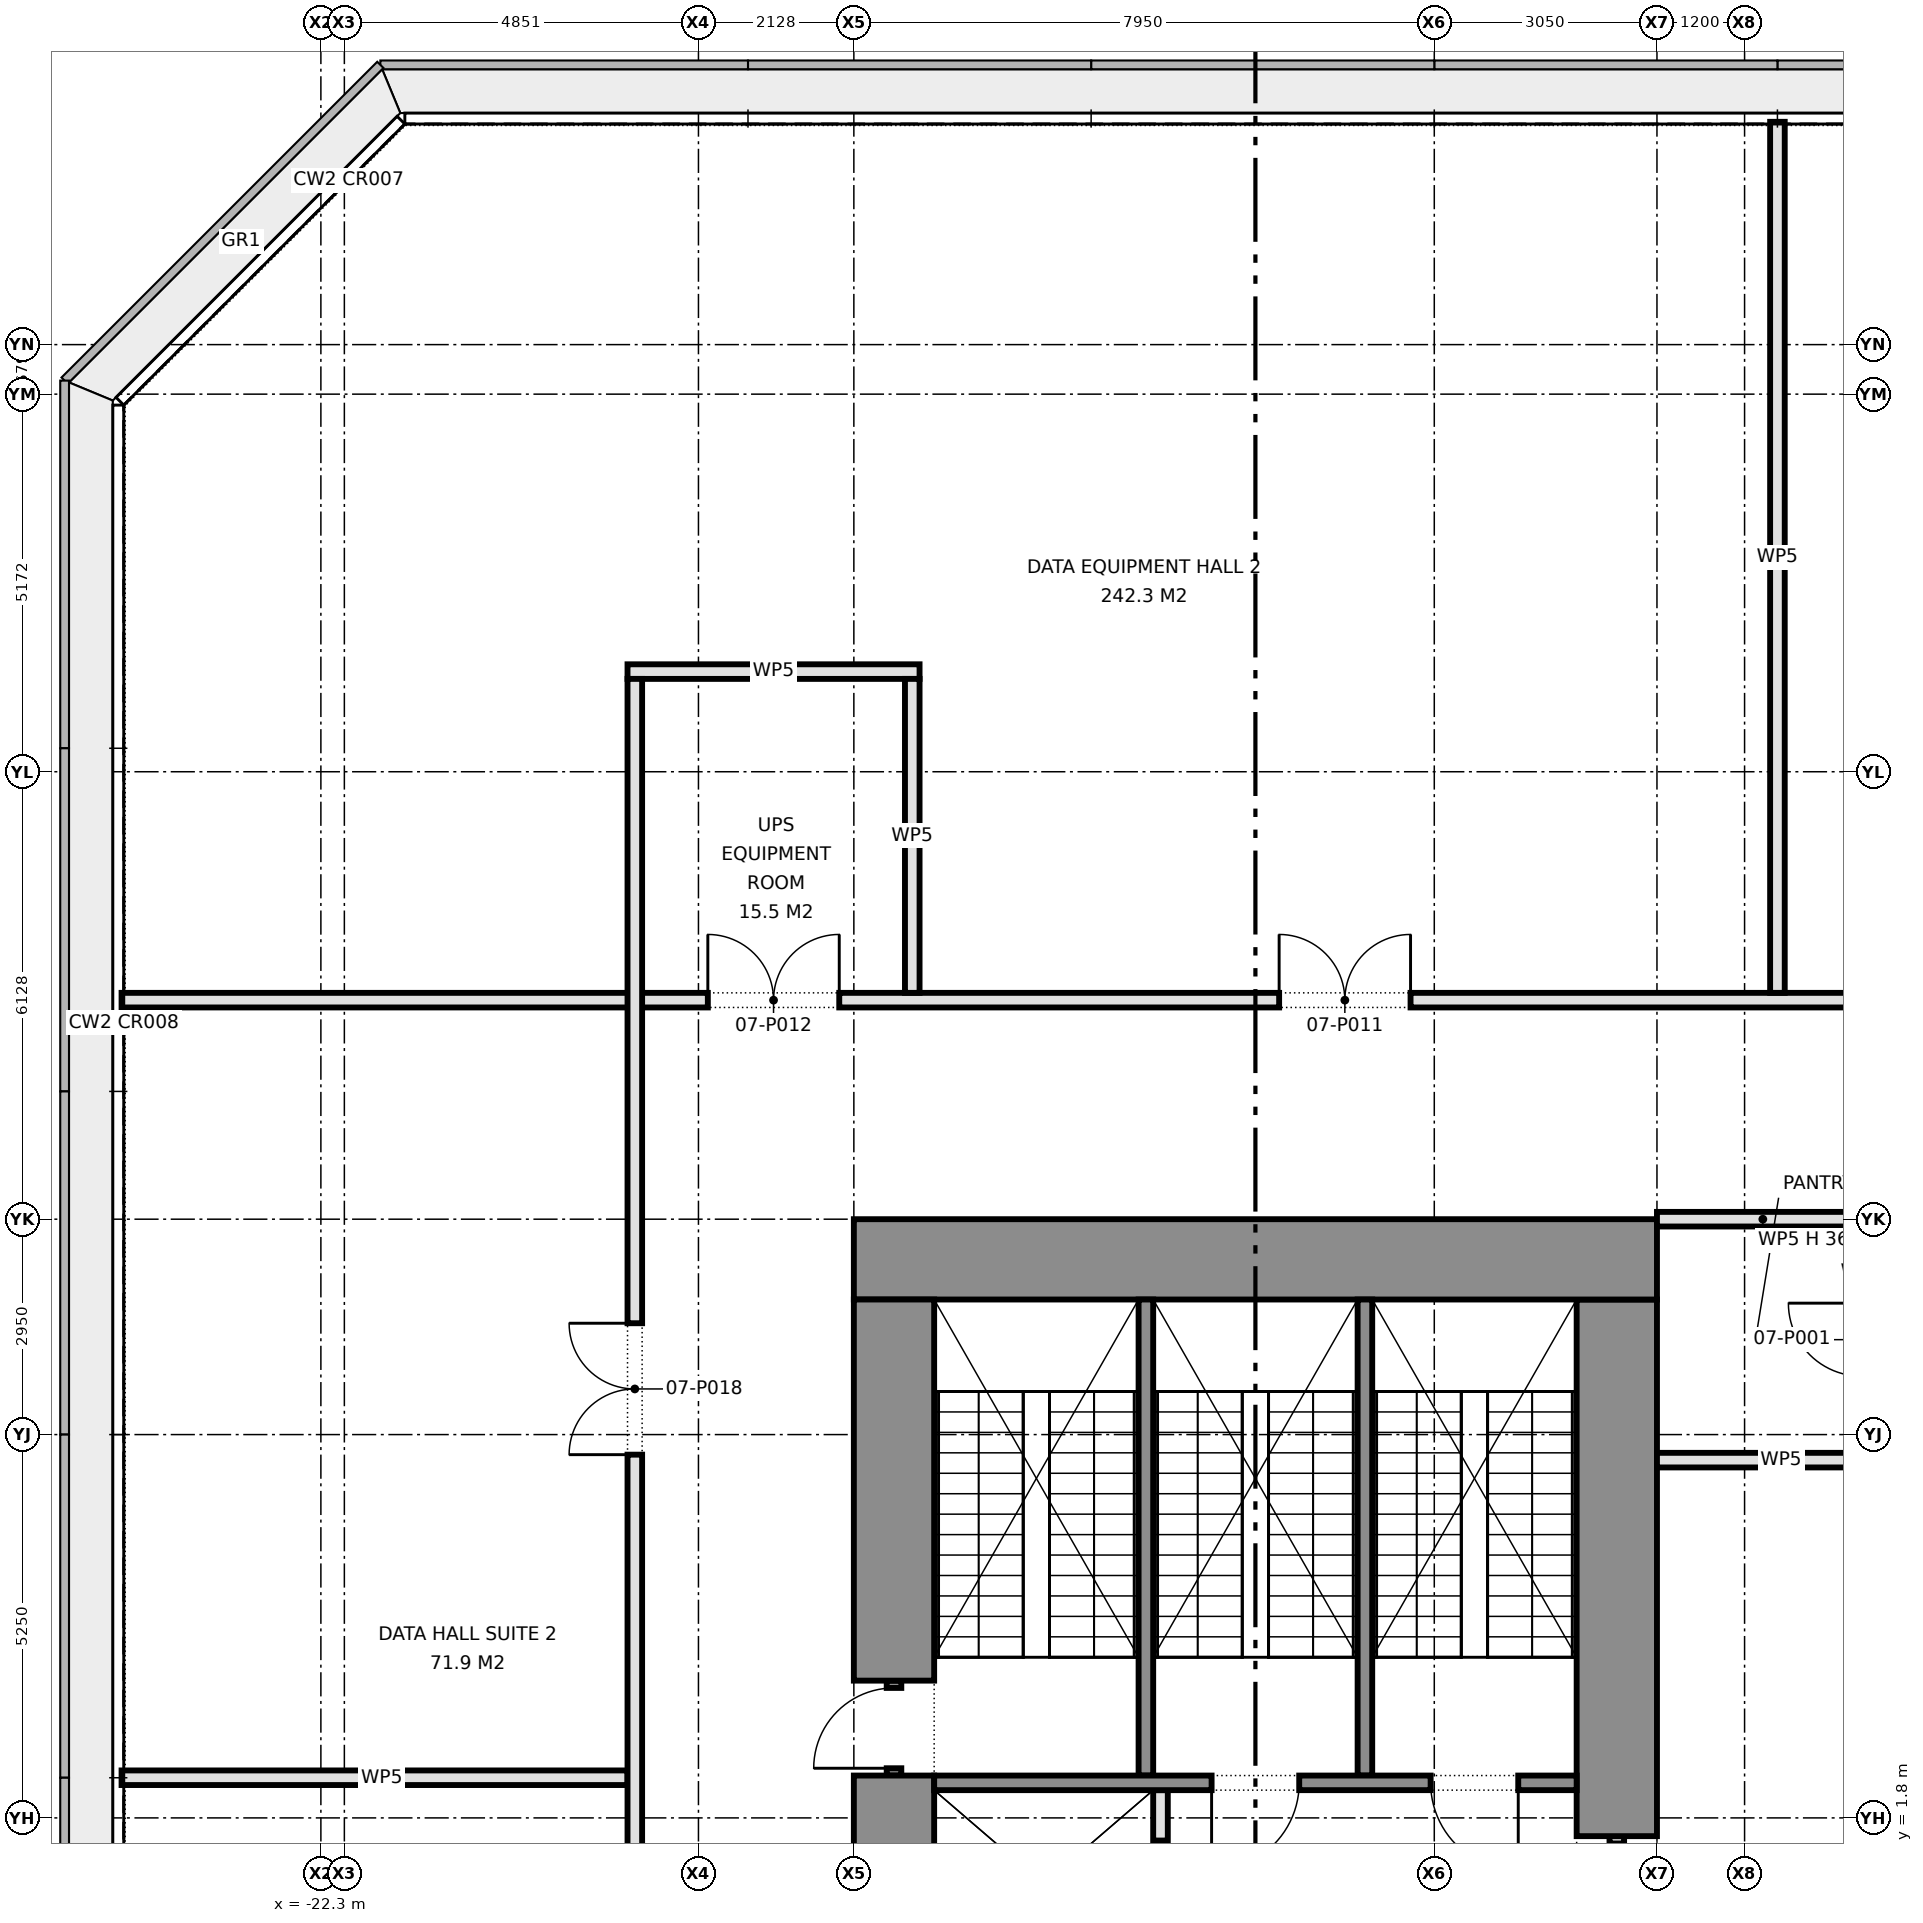
"""IFC4 building model, lengths in metres.
Left out: names, types, materials, properties, quantities, classifications, styles, units other than length and angle.
Written with IfcOpenShell. Run it as: python <this file> out.ifc"""

import sys

from ifc_helpers import new_model, si_unit, direction, frame, frame_2d, origin, place, context, subcontext, project, spatial, rectangle, extrude, element, fill, save


model = new_model("IFC4")
c1 = context("Model", 3, precision=1e-05, world=origin(), true_north=direction((0.0, 1.0)))
c2 = subcontext(c1, "Body", "Model", "MODEL_VIEW")
j1 = project(units=[si_unit("LENGTHUNIT", "METRE"), si_unit("PLANEANGLEUNIT", "RADIAN")], contexts=[c1])
p1 = place(None, origin())
s1 = spatial("IfcSite", under=j1, at=p1, CompositionType="ELEMENT")
p2 = place(p1, origin())
s2 = spatial("IfcBuilding", under=s1, at=p2, CompositionType="ELEMENT")
p3 = place(p2, frame((0.0, 0.0, 30.5)))
s3 = spatial("IfcBuildingStorey", under=s2, at=p3, CompositionType="ELEMENT", Elevation=30.5)
p4 = place(p3, frame((-15.0, 9.45, 0.0), z_axis=(0.0, 0.0, 1.0), x_axis=(1.0, 0.0, 0.0)))
e1 = element("IfcWall", 1, at=p4, inside=s3, PredefinedType="SHEAR", context=c2, shape_type="SweptSolid", body=[
    extrude(rectangle(XDim=11.0, YDim=1.1, at=frame_2d((5.5, 0.0))), origin(), (0.0, 0.0, 1.0), 4.575),
])
p5 = place(p3, frame((-14.45, -3.75, 0.0), z_axis=(0.0, 0.0, 1.0), x_axis=(0.0, 1.0, 0.0)))
e2 = element("IfcWall", 2, at=p5, inside=s3, PredefinedType="SHEAR", context=c2, shape_type="SweptSolid", body=[
    extrude(rectangle(XDim=6.13, YDim=1.1, at=frame_2d((3.065, 0.0))), origin(), (0.0, 0.0, 1.0), 4.575),
])
p6 = place(p3, frame((-14.45, 2.38, 0.0), z_axis=(0.0, 0.0, 1.0), x_axis=(0.0, 1.0, 0.0)))
e3 = element("IfcWall", 3, at=p6, inside=s3, PredefinedType="SHEAR", context=c2, shape_type="SweptSolid", body=[
    extrude(rectangle(XDim=1.3, YDim=0.2, at=frame_2d((0.65, 0.0))), origin(), (0.0, 0.0, 1.0), 2.4),
])
p7 = place(p6, frame((0.1, 0.0, 0.0)))
e4 = element("IfcOpeningElement", 4, at=p7, cuts=e3, PredefinedType="OPENING", context=c2, shape_type="SweptSolid", body=[
    extrude(rectangle(XDim=1.1, YDim=2.1, at=frame_2d((0.55, 1.05))), frame((0.0, 0.11, 0.0), z_axis=(0.0, -1.0, 0.0), x_axis=(1.0, 0.0, 0.0)), (0.0, 0.0, 1.0), 0.22),
])
p8 = place(p3, frame((-14.45, 3.68, 0.0), z_axis=(0.0, 0.0, 1.0), x_axis=(0.0, 1.0, 0.0)))
e5 = element("IfcWall", 5, at=p8, inside=s3, PredefinedType="SHEAR", context=c2, shape_type="SweptSolid", body=[
    extrude(rectangle(XDim=5.22, YDim=1.1, at=frame_2d((2.61, 0.0))), origin(), (0.0, 0.0, 1.0), 4.575),
])
p9 = place(p3, frame((-4.55, 0.25, 0.0), z_axis=(0.0, 0.0, 1.0), x_axis=(0.0, 1.0, 0.0)))
e6 = element("IfcWall", 6, at=p9, inside=s3, PredefinedType="PARTITIONING", context=c2, shape_type="SweptSolid", body=[
    extrude(rectangle(XDim=1.3, YDim=0.2, at=frame_2d((0.65, 0.0))), origin(), (0.0, 0.0, 1.0), 2.4),
])
p10 = place(p9, frame((0.1, 0.0, 0.0)))
e7 = element("IfcOpeningElement", 7, at=p10, cuts=e6, PredefinedType="OPENING", context=c2, shape_type="SweptSolid", body=[
    extrude(rectangle(XDim=1.1, YDim=2.1, at=frame_2d((0.55, 1.05))), frame((0.0, 0.11, 0.0), z_axis=(0.0, -1.0, 0.0), x_axis=(1.0, 0.0, 0.0)), (0.0, 0.0, 1.0), 0.22),
])
p11 = place(p3, frame((-4.55, 1.55, 0.0), z_axis=(0.0, 0.0, 1.0), x_axis=(0.0, 1.0, 0.0)))
e8 = element("IfcWall", 8, at=p11, inside=s3, PredefinedType="SHEAR", context=c2, shape_type="SweptSolid", body=[
    extrude(rectangle(XDim=7.35, YDim=1.1, at=frame_2d((3.675, 0.0))), origin(), (0.0, 0.0, 1.0), 4.575),
])
p12 = place(p3, frame((-10.8, -0.4, 0.0), z_axis=(0.0, 0.0, 1.0), x_axis=(0.0, 1.0, 0.0)))
e9 = element("IfcWall", 9, at=p12, inside=s3, PredefinedType="PARTITIONING", context=c2, shape_type="SweptSolid", body=[
    extrude(rectangle(XDim=2.58, YDim=0.2, at=frame_2d((1.29, 0.0))), origin(), (0.0, 0.0, 1.0), 4.575),
])
p13 = place(p12, frame((0.69, 0.0, 0.0)))
e10 = element("IfcOpeningElement", 10, at=p13, cuts=e9, PredefinedType="OPENING", context=c2, shape_type="SweptSolid", body=[
    extrude(rectangle(XDim=1.2, YDim=2.1, at=frame_2d((0.6, 1.05))), frame((0.0, 0.11, 0.0), z_axis=(0.0, -1.0, 0.0), x_axis=(1.0, 0.0, 0.0)), (0.0, 0.0, 1.0), 0.22),
])
p14 = place(p3, frame((-13.9, 2.28, 0.0), z_axis=(0.0, 0.0, 1.0), x_axis=(1.0, 0.0, 0.0)))
e11 = element("IfcWall", 11, at=p14, inside=s3, PredefinedType="SHEAR", context=c2, shape_type="SweptSolid", body=[
    extrude(rectangle(XDim=8.8, YDim=0.2, at=frame_2d((4.4, 0.0))), origin(), (0.0, 0.0, 1.0), 4.575),
])
p15 = place(p14, frame((3.8, 0.0, 0.0)))
e12 = element("IfcOpeningElement", 12, at=p15, cuts=e11, PredefinedType="OPENING", context=c2, shape_type="SweptSolid", body=[
    extrude(rectangle(XDim=1.2, YDim=2.1, at=frame_2d((0.6, 1.05))), frame((0.0, 0.11, 0.0), z_axis=(0.0, -1.0, 0.0), x_axis=(1.0, 0.0, 0.0)), (0.0, 0.0, 1.0), 0.22),
])
p16 = place(p14, frame((6.8, 0.0, 0.0)))
e13 = element("IfcOpeningElement", 13, at=p16, cuts=e11, PredefinedType="OPENING", context=c2, shape_type="SweptSolid", body=[
    extrude(rectangle(XDim=1.2, YDim=2.1, at=frame_2d((0.6, 1.05))), frame((0.0, 0.11, 0.0), z_axis=(0.0, -1.0, 0.0), x_axis=(1.0, 0.0, 0.0)), (0.0, 0.0, 1.0), 0.22),
])
for number, where, z_axis, x_axis in (
    (14, (-11.0, 2.38, 0.0), (0.0, 0.0, 1.0), (0.0, 1.0, 0.0)),
    (15, (-8.0, 2.38, 0.0), (0.0, 0.0, 1.0), (0.0, 1.0, 0.0)),
):
    element("IfcWall", number, at=place(p3, frame(where, z_axis=z_axis, x_axis=x_axis)), inside=s3, PredefinedType="SHEAR", context=c2, shape_type="SweptSolid", body=[
        extrude(rectangle(XDim=6.52, YDim=0.2, at=frame_2d((3.26, 0.0))), origin(), (0.0, 0.0, 1.0), 4.575),
    ])
p17 = place(p3, frame((-25.03, 2.35, 0.0), z_axis=(0.0, 0.0, 1.0), x_axis=(1.0, 0.0, 0.0)))
e16 = element("IfcWall", 16, at=p17, inside=s3, PredefinedType="PARTITIONING", context=c2, shape_type="SweptSolid", body=[
    extrude(rectangle(XDim=6.93, YDim=0.2, at=frame_2d((3.465, 0.0))), origin(), (0.0, 0.0, 1.0), 4.575),
])
p18 = place(p3, frame((-4.0, 6.7, 0.0), z_axis=(0.0, 0.0, 1.0), x_axis=(1.0, 0.0, 0.0)))
e17 = element("IfcWall", 17, at=p18, inside=s3, PredefinedType="PARTITIONING", context=c2, shape_type="SweptSolid", body=[
    extrude(rectangle(XDim=2.9, YDim=0.2, at=frame_2d((1.45, 0.0))), origin(), (0.0, 0.0, 1.0), 4.575),
])
p19 = place(p3, frame((-4.0, 10.0, 0.0), z_axis=(0.0, 0.0, 1.0), x_axis=(1.0, 0.0, 0.0)))
e18 = element("IfcWall", 18, at=p19, inside=s3, PredefinedType="PARTITIONING", context=c2, shape_type="SweptSolid", body=[
    extrude(rectangle(XDim=2.9, YDim=0.2, at=frame_2d((1.45, 0.0))), origin(), (0.0, 0.0, 1.0), 3.628),
])
p20 = place(p3, frame((-25.03, 13.0, 0.0), z_axis=(0.0, 0.0, 1.0), x_axis=(1.0, 0.0, 0.0)))
e19 = element("IfcWall", 19, at=p20, inside=s3, PredefinedType="PARTITIONING", context=c2, shape_type="SweptSolid", body=[
    extrude(rectangle(XDim=50.06, YDim=0.2, at=frame_2d((25.03, 0.0))), origin(), (0.0, 0.0, 1.0), 4.575),
])
p21 = place(p20, frame((15.855, 0.0, 0.0)))
e20 = element("IfcOpeningElement", 20, at=p21, cuts=e19, PredefinedType="OPENING", context=c2, shape_type="SweptSolid", body=[
    extrude(rectangle(XDim=1.8, YDim=2.1, at=frame_2d((0.9, 1.05))), frame((0.0, 0.11, 0.0), z_axis=(0.0, -1.0, 0.0), x_axis=(1.0, 0.0, 0.0)), (0.0, 0.0, 1.0), 0.22),
])
p22 = place(p20, frame((8.03, 0.0, 0.0)))
e21 = element("IfcOpeningElement", 21, at=p22, cuts=e19, PredefinedType="OPENING", context=c2, shape_type="SweptSolid", body=[
    extrude(rectangle(XDim=1.8, YDim=2.1, at=frame_2d((0.9, 1.05))), frame((0.0, 0.11, 0.0), z_axis=(0.0, -1.0, 0.0), x_axis=(1.0, 0.0, 0.0)), (0.0, 0.0, 1.0), 0.22),
])
p23 = place(p20, frame((31.96, 0.0, 0.0)))
e22 = element("IfcOpeningElement", 22, at=p23, cuts=e19, PredefinedType="OPENING", context=c2, shape_type="SweptSolid", body=[
    extrude(rectangle(XDim=1.8, YDim=2.1, at=frame_2d((0.9, 1.05))), frame((0.0, 0.11, 0.0), z_axis=(0.0, -1.0, 0.0), x_axis=(1.0, 0.0, 0.0)), (0.0, 0.0, 1.0), 0.22),
])
p24 = place(p3, frame((-18.1, 17.5, 0.0), z_axis=(0.0, 0.0, 1.0), x_axis=(1.0, 0.0, 0.0)))
e23 = element("IfcWall", 23, at=p24, inside=s3, PredefinedType="PARTITIONING", context=c2, shape_type="SweptSolid", body=[
    extrude(rectangle(XDim=4.0, YDim=0.2, at=frame_2d((2.0, 0.0))), origin(), (0.0, 0.0, 1.0), 4.575),
])
p25 = place(p3, frame((-2.35, 13.1, 0.0), z_axis=(0.0, 0.0, 1.0), x_axis=(0.0, 1.0, 0.0)))
e24 = element("IfcWall", 24, at=p25, inside=s3, PredefinedType="PARTITIONING", context=c2, shape_type="SweptSolid", body=[
    extrude(rectangle(XDim=11.93, YDim=0.2, at=frame_2d((5.965, 0.0))), origin(), (0.0, 0.0, 1.0), 4.575),
])
p26 = place(p3, frame((-14.2, 13.1, 0.0), z_axis=(0.0, 0.0, 1.0), x_axis=(0.0, 1.0, 0.0)))
e25 = element("IfcWall", 25, at=p26, inside=s3, PredefinedType="PARTITIONING", context=c2, shape_type="SweptSolid", body=[
    extrude(rectangle(XDim=4.3, YDim=0.2, at=frame_2d((2.15, 0.0))), origin(), (0.0, 0.0, 1.0), 4.575),
])
p27 = place(p3, frame((-18.0, -12.9, 0.0), z_axis=(0.0, 0.0, 1.0), x_axis=(0.0, 1.0, 0.0)))
e26 = element("IfcWall", 26, at=p27, inside=s3, PredefinedType="PARTITIONING", context=c2, shape_type="SweptSolid", body=[
    extrude(rectangle(XDim=30.3, YDim=0.2, at=frame_2d((15.15, 0.0))), origin(), (0.0, 0.0, 1.0), 4.575),
])
p28 = place(p27, frame((6.675, 0.0, 0.0)))
e27 = element("IfcOpeningElement", 27, at=p28, cuts=e26, PredefinedType="OPENING", context=c2, shape_type="SweptSolid", body=[
    extrude(rectangle(XDim=1.8, YDim=2.1, at=frame_2d((0.9, 1.05))), frame((0.0, 0.11, 0.0), z_axis=(0.0, -1.0, 0.0), x_axis=(1.0, 0.0, 0.0)), (0.0, 0.0, 1.0), 0.22),
])
p29 = place(p27, frame((19.675, 0.0, 0.0)))
e28 = element("IfcOpeningElement", 28, at=p29, cuts=e26, PredefinedType="OPENING", context=c2, shape_type="SweptSolid", body=[
    extrude(rectangle(XDim=1.8, YDim=2.1, at=frame_2d((0.9, 1.05))), frame((0.0, 0.11, 0.0), z_axis=(0.0, -1.0, 0.0), x_axis=(1.0, 0.0, 0.0)), (0.0, 0.0, 1.0), 0.22),
])
p30 = place(p7, origin())
e29 = element("IfcDoor", 29, at=p30, inside=s3, OperationType="SINGLE_SWING_LEFT", PredefinedType="DOOR", context=c2, shape_type="SweptSolid", body=[
    extrude(rectangle(XDim=1.1, YDim=2.1, at=frame_2d((0.55, 1.05))), frame((0.0, 0.025, 0.0), z_axis=(0.0, -1.0, 0.0), x_axis=(1.0, 0.0, 0.0)), (0.0, 0.0, 1.0), 0.05),
])
fill(e4, e29)
p31 = place(p10, origin())
e30 = element("IfcDoor", 30, at=p31, inside=s3, OperationType="SINGLE_SWING_LEFT", PredefinedType="DOOR", context=c2, shape_type="SweptSolid", body=[
    extrude(rectangle(XDim=1.1, YDim=2.1, at=frame_2d((0.55, 1.05))), frame((0.0, 0.025, 0.0), z_axis=(0.0, -1.0, 0.0), x_axis=(1.0, 0.0, 0.0)), (0.0, 0.0, 1.0), 0.05),
])
fill(e7, e30)
p32 = place(p13, origin())
e31 = element("IfcDoor", 31, at=p32, inside=s3, OperationType="DOUBLE_DOOR_SLIDING", PredefinedType="DOOR", context=c2, shape_type="SweptSolid", body=[
    extrude(rectangle(XDim=1.2, YDim=2.1, at=frame_2d((0.6, 1.05))), frame((0.0, 0.025, 0.0), z_axis=(0.0, -1.0, 0.0), x_axis=(1.0, 0.0, 0.0)), (0.0, 0.0, 1.0), 0.05),
])
fill(e10, e31)
p33 = place(p15, frame((1.2, 0.0, 0.0), z_axis=(0.0, 0.0, 1.0), x_axis=(-1.0, 0.0, 0.0)))
e32 = element("IfcDoor", 32, at=p33, inside=s3, OperationType="SINGLE_SWING_RIGHT", PredefinedType="DOOR", context=c2, shape_type="SweptSolid", body=[
    extrude(rectangle(XDim=1.2, YDim=2.1, at=frame_2d((0.6, 1.05))), frame((0.0, 0.025, 0.0), z_axis=(0.0, -1.0, 0.0), x_axis=(1.0, 0.0, 0.0)), (0.0, 0.0, 1.0), 0.05),
])
fill(e12, e32)
p34 = place(p16, frame((1.2, 0.0, 0.0), z_axis=(0.0, 0.0, 1.0), x_axis=(-1.0, 0.0, 0.0)))
e33 = element("IfcDoor", 33, at=p34, inside=s3, OperationType="SINGLE_SWING_LEFT", PredefinedType="DOOR", context=c2, shape_type="SweptSolid", body=[
    extrude(rectangle(XDim=1.2, YDim=2.1, at=frame_2d((0.6, 1.05))), frame((0.0, 0.025, 0.0), z_axis=(0.0, -1.0, 0.0), x_axis=(1.0, 0.0, 0.0)), (0.0, 0.0, 1.0), 0.05),
])
fill(e13, e33)
p35 = place(p21, origin())
e34 = element("IfcDoor", 34, at=p35, inside=s3, OperationType="DOUBLE_DOOR_SINGLE_SWING", PredefinedType="DOOR", context=c2, shape_type="SweptSolid", body=[
    extrude(rectangle(XDim=1.8, YDim=2.1, at=frame_2d((0.9, 1.05))), frame((0.0, 0.025, 0.0), z_axis=(0.0, -1.0, 0.0), x_axis=(1.0, 0.0, 0.0)), (0.0, 0.0, 1.0), 0.05),
])
fill(e20, e34)
p36 = place(p22, origin())
e35 = element("IfcDoor", 35, at=p36, inside=s3, OperationType="DOUBLE_DOOR_SINGLE_SWING", PredefinedType="DOOR", context=c2, shape_type="SweptSolid", body=[
    extrude(rectangle(XDim=1.8, YDim=2.1, at=frame_2d((0.9, 1.05))), frame((0.0, 0.025, 0.0), z_axis=(0.0, -1.0, 0.0), x_axis=(1.0, 0.0, 0.0)), (0.0, 0.0, 1.0), 0.05),
])
fill(e21, e35)
p37 = place(p29, origin())
e36 = element("IfcDoor", 36, at=p37, inside=s3, OperationType="DOUBLE_DOOR_SINGLE_SWING", PredefinedType="DOOR", context=c2, shape_type="SweptSolid", body=[
    extrude(rectangle(XDim=1.8, YDim=2.1, at=frame_2d((0.9, 1.05))), frame((0.0, 0.025, 0.0), z_axis=(0.0, -1.0, 0.0), x_axis=(1.0, 0.0, 0.0)), (0.0, 0.0, 1.0), 0.05),
])
fill(e28, e36)
save(model, sys.argv[1])
